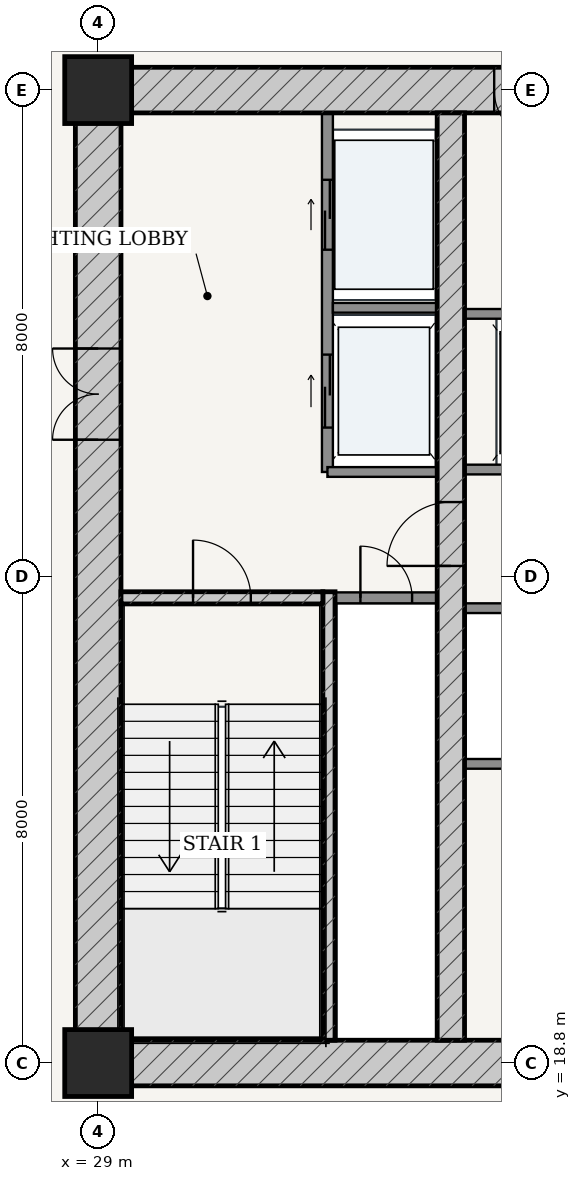
"""IFC4 building model, lengths in metres.
Left out: names, types, materials, properties, quantities, classifications, styles, units other than length and angle.
Written with IfcOpenShell. Run it as: python <this file> out.ifc"""

import sys

from ifc_helpers import new_model, si_unit, direction, frame, frame_2d, origin, origin_2d, place, context, subcontext, project, spatial, rectangle, extrude, source, transform, mapped, element, fill, save


model = new_model("IFC4")
c1 = context("Model", 3, precision=1e-05, world=origin(), true_north=direction((-0.2419218956, 0.970295726276)))
c2 = subcontext(c1, "Body", "Model", "MODEL_VIEW")
j1 = project(units=[si_unit("LENGTHUNIT", "METRE"), si_unit("PLANEANGLEUNIT", "RADIAN")], contexts=[c1])
p1 = place(None, origin())
s1 = spatial("IfcSite", under=j1, at=p1, CompositionType="ELEMENT")
p2 = place(p1, origin())
s2 = spatial("IfcBuilding", under=s1, at=p2, CompositionType="ELEMENT")
p3 = place(p2, frame((0.0, 0.0, 14.4)))
s3 = spatial("IfcBuildingStorey", under=s2, at=p3, CompositionType="ELEMENT", Elevation=14.4)
for number, where, z_axis, x_axis in (
    (1, (29.0, 18.8, 0.0), (0.0, 0.0, 1.0), (1.0, 0.0, 0.0)),
    (2, (29.0, 34.8, 0.0), (0.0, 0.0, 1.0), (1.0, 0.0, 0.0)),
):
    element("IfcColumn", number, at=place(p3, frame(where, z_axis=z_axis, x_axis=x_axis)), inside=s3, PredefinedType="COLUMN", context=c2, shape_type="SweptSolid", body=[
        extrude(rectangle(XDim=1.1, YDim=1.1, at=origin_2d()), origin(), (0.0, 0.0, 1.0), 4.5),
    ])
p4 = place(p3, frame((28.625, 18.8, 0.0), z_axis=(0.0, 0.0, 1.0), x_axis=(1.0, 0.0, 0.0)))
e3 = element("IfcWall", 3, at=p4, inside=s3, PredefinedType="SHEAR", context=c2, shape_type="SweptSolid", body=[
    extrude(rectangle(XDim=18.75, YDim=0.75, at=frame_2d((9.375, 0.0))), origin(), (0.0, 0.0, 1.0), 4.05),
])
p5 = place(p4, frame((7.627, 0.0, 0.0)))
e4 = element("IfcOpeningElement", 4, at=p5, cuts=e3, PredefinedType="OPENING", context=c2, shape_type="SweptSolid", body=[
    extrude(rectangle(XDim=0.85, YDim=2.1, at=frame_2d((0.425, 1.05))), frame((0.0, 0.385, 0.0), z_axis=(0.0, -1.0, 0.0), x_axis=(1.0, 0.0, 0.0)), (0.0, 0.0, 1.0), 0.77),
])
p6 = place(p4, frame((10.673, 0.0, 0.0)))
e5 = element("IfcOpeningElement", 5, at=p6, cuts=e3, PredefinedType="OPENING", context=c2, shape_type="SweptSolid", body=[
    extrude(rectangle(XDim=0.85, YDim=2.1, at=frame_2d((0.425, 1.05))), frame((0.0, 0.385, 0.0), z_axis=(0.0, -1.0, 0.0), x_axis=(1.0, 0.0, 0.0)), (0.0, 0.0, 1.0), 0.77),
])
p7 = place(p3, frame((28.625, 34.8, 0.0), z_axis=(0.0, 0.0, 1.0), x_axis=(1.0, 0.0, 0.0)))
e6 = element("IfcWall", 6, at=p7, inside=s3, PredefinedType="SHEAR", context=c2, shape_type="SweptSolid", body=[
    extrude(rectangle(XDim=18.75, YDim=0.75, at=frame_2d((9.375, 0.0))), origin(), (0.0, 0.0, 1.0), 4.05),
])
p8 = place(p7, frame((6.887, 0.0, 0.0)))
e7 = element("IfcOpeningElement", 7, at=p8, cuts=e6, PredefinedType="OPENING", context=c2, shape_type="SweptSolid", body=[
    extrude(rectangle(XDim=0.85, YDim=2.1, at=frame_2d((0.425, 1.05))), frame((0.0, 0.385, 0.0), z_axis=(0.0, -1.0, 0.0), x_axis=(1.0, 0.0, 0.0)), (0.0, 0.0, 1.0), 0.77),
])
p9 = place(p7, frame((8.945, 0.0, 0.0)))
e8 = element("IfcOpeningElement", 8, at=p9, cuts=e6, PredefinedType="OPENING", context=c2, shape_type="SweptSolid", body=[
    extrude(rectangle(XDim=0.86, YDim=2.1, at=frame_2d((0.43, 1.05))), frame((0.0, 0.385, 0.0), z_axis=(0.0, -1.0, 0.0), x_axis=(1.0, 0.0, 0.0)), (0.0, 0.0, 1.0), 0.77),
])
p10 = place(p7, frame((11.012, 0.0, 0.0)))
e9 = element("IfcOpeningElement", 9, at=p10, cuts=e6, PredefinedType="OPENING", context=c2, shape_type="SweptSolid", body=[
    extrude(rectangle(XDim=0.85, YDim=2.1, at=frame_2d((0.425, 1.05))), frame((0.0, 0.385, 0.0), z_axis=(0.0, -1.0, 0.0), x_axis=(1.0, 0.0, 0.0)), (0.0, 0.0, 1.0), 0.77),
])
p11 = place(p3, frame((29.0, 19.175, 0.0), z_axis=(0.0, 0.0, 1.0), x_axis=(0.0, 1.0, 0.0)))
e10 = element("IfcWall", 10, at=p11, inside=s3, PredefinedType="SHEAR", context=c2, shape_type="SweptSolid", body=[
    extrude(rectangle(XDim=15.25, YDim=0.75, at=frame_2d((7.625, 0.0))), origin(), (0.0, 0.0, 1.0), 4.05),
])
p12 = place(p11, frame((9.875, 0.0, 0.0)))
e11 = element("IfcOpeningElement", 11, at=p12, cuts=e10, PredefinedType="OPENING", context=c2, shape_type="SweptSolid", body=[
    extrude(rectangle(XDim=1.5, YDim=2.2, at=frame_2d((0.75, 1.1))), frame((0.0, 0.385, 0.0), z_axis=(0.0, -1.0, 0.0), x_axis=(1.0, 0.0, 0.0)), (0.0, 0.0, 1.0), 0.77),
])
p13 = place(p3, frame((32.795, 19.175, 0.0), z_axis=(0.0, 0.0, 1.0), x_axis=(0.0, 1.0, 0.0)))
e12 = element("IfcWall", 12, at=p13, inside=s3, PredefinedType="SOLIDWALL", context=c2, shape_type="SweptSolid", body=[
    extrude(rectangle(XDim=7.375, YDim=0.2, at=frame_2d((3.688, 0.0))), origin(), (0.0, 0.0, 1.0), 4.05),
])
p14 = place(p3, frame((29.375, 26.45, 0.0), z_axis=(0.0, 0.0, 1.0), x_axis=(1.0, 0.0, 0.0)))
e13 = element("IfcWall", 13, at=p14, inside=s3, PredefinedType="SOLIDWALL", context=c2, shape_type="SweptSolid", body=[
    extrude(rectangle(XDim=3.32, YDim=0.2, at=frame_2d((1.66, 0.0))), origin(), (0.0, 0.0, 1.0), 4.05),
])
p15 = place(p14, frame((1.185, 0.0, 0.0)))
e14 = element("IfcOpeningElement", 14, at=p15, cuts=e13, PredefinedType="OPENING", context=c2, shape_type="SweptSolid", body=[
    extrude(rectangle(XDim=0.95, YDim=2.15, at=frame_2d((0.475, 1.075))), frame((0.0, 0.11, 0.0), z_axis=(0.0, -1.0, 0.0), x_axis=(1.0, 0.0, 0.0)), (0.0, 0.0, 1.0), 0.22),
])
p16 = place(p3, frame((34.8, 19.175, 0.0), z_axis=(0.0, 0.0, 1.0), x_axis=(0.0, 1.0, 0.0)))
e15 = element("IfcWall", 15, at=p16, inside=s3, PredefinedType="SHEAR", context=c2, shape_type="SweptSolid", body=[
    extrude(rectangle(XDim=15.25, YDim=0.45, at=frame_2d((7.625, 0.0))), origin(), (0.0, 0.0, 1.0), 4.05),
])
p17 = place(p16, frame((7.8, 0.0, 0.0)))
e16 = element("IfcOpeningElement", 16, at=p17, cuts=e15, PredefinedType="OPENING", context=c2, shape_type="SweptSolid", body=[
    extrude(rectangle(XDim=1.05, YDim=2.15, at=frame_2d((0.525, 1.075))), frame((0.0, 0.235, 0.0), z_axis=(0.0, -1.0, 0.0), x_axis=(1.0, 0.0, 0.0)), (0.0, 0.0, 1.0), 0.47),
])
p18 = place(p3, frame((32.9, 26.45, 0.0), z_axis=(0.0, 0.0, 1.0), x_axis=(1.0, 0.0, 0.0)))
e17 = element("IfcWall", 17, at=p18, inside=s3, PredefinedType="PARTITIONING", context=c2, shape_type="SweptSolid", body=[
    extrude(rectangle(XDim=1.675, YDim=0.18, at=frame_2d((0.837, 0.0))), origin(), (0.0, 0.0, 1.0), 4.05),
])
p19 = place(p18, frame((0.413, 0.0, 0.0)))
e18 = element("IfcOpeningElement", 18, at=p19, cuts=e17, PredefinedType="OPENING", context=c2, shape_type="SweptSolid", body=[
    extrude(rectangle(XDim=0.85, YDim=2.1, at=frame_2d((0.425, 1.05))), frame((0.0, 0.1, 0.0), z_axis=(0.0, -1.0, 0.0), x_axis=(1.0, 0.0, 0.0)), (0.0, 0.0, 1.0), 0.2),
])
p20 = place(p3, frame((32.77, 28.52, 0.0), z_axis=(0.0, 0.0, 1.0), x_axis=(0.0, 1.0, 0.0)))
e19 = element("IfcWall", 19, at=p20, inside=s3, PredefinedType="PARTITIONING", context=c2, shape_type="SweptSolid", body=[
    extrude(rectangle(XDim=5.905, YDim=0.18, at=frame_2d((2.953, 0.0))), origin(), (0.0, 0.0, 1.0), 4.05),
])
p21 = place(p20, frame((3.655, 0.0, 0.0)))
e20 = element("IfcOpeningElement", 20, at=p21, cuts=e19, PredefinedType="OPENING", context=c2, shape_type="SweptSolid", body=[
    extrude(rectangle(XDim=1.15, YDim=2.2, at=frame_2d((0.575, 1.1))), frame((0.0, 0.1, 0.0), z_axis=(0.0, -1.0, 0.0), x_axis=(1.0, 0.0, 0.0)), (0.0, 0.0, 1.0), 0.2),
])
p22 = place(p20, frame((0.73, 0.0, 0.0)))
e21 = element("IfcOpeningElement", 21, at=p22, cuts=e19, PredefinedType="OPENING", context=c2, shape_type="SweptSolid", body=[
    extrude(rectangle(XDim=1.2, YDim=2.25, at=frame_2d((0.6, 1.125))), frame((0.0, 0.1, 0.0), z_axis=(0.0, -1.0, 0.0), x_axis=(1.0, 0.0, 0.0)), (0.0, 0.0, 1.0), 0.2),
])
p23 = place(p3, frame((32.86, 31.22, 0.0), z_axis=(0.0, 0.0, 1.0), x_axis=(1.0, 0.0, 0.0)))
e22 = element("IfcWall", 22, at=p23, inside=s3, PredefinedType="PARTITIONING", context=c2, shape_type="SweptSolid", body=[
    extrude(rectangle(XDim=1.715, YDim=0.16, at=frame_2d((0.857, 0.0))), origin(), (0.0, 0.0, 1.0), 4.05),
])
p24 = place(p3, frame((32.77, 28.52, 0.0), z_axis=(0.0, 0.0, 1.0), x_axis=(1.0, 0.0, 0.0)))
e23 = element("IfcWall", 23, at=p24, inside=s3, PredefinedType="PARTITIONING", context=c2, shape_type="SweptSolid", body=[
    extrude(rectangle(XDim=1.805, YDim=0.16, at=frame_2d((0.902, 0.0))), origin(), (0.0, 0.0, 1.0), 4.05),
])
p25 = place(p3, frame((35.025, 28.56, 0.0), z_axis=(0.0, 0.0, 1.0), x_axis=(1.0, 0.0, 0.0)))
e24 = element("IfcWall", 24, at=p25, inside=s3, PredefinedType="PARTITIONING", context=c2, shape_type="SweptSolid", body=[
    extrude(rectangle(XDim=5.95, YDim=0.16, at=frame_2d((2.975, 0.0))), origin(), (0.0, 0.0, 1.0), 4.05),
])
p26 = place(p25, frame((0.76, 0.0, 0.0)))
e25 = element("IfcOpeningElement", 25, at=p26, cuts=e24, PredefinedType="OPENING", context=c2, shape_type="SweptSolid", body=[
    extrude(rectangle(XDim=1.1, YDim=2.2, at=frame_2d((0.55, 1.1))), frame((0.0, 0.09, 0.0), z_axis=(0.0, -1.0, 0.0), x_axis=(1.0, 0.0, 0.0)), (0.0, 0.0, 1.0), 0.18),
])
p27 = place(p25, frame((2.425, 0.0, 0.0)))
e26 = element("IfcOpeningElement", 26, at=p27, cuts=e24, PredefinedType="OPENING", context=c2, shape_type="SweptSolid", body=[
    extrude(rectangle(XDim=1.1, YDim=2.2, at=frame_2d((0.55, 1.1))), frame((0.0, 0.09, 0.0), z_axis=(0.0, -1.0, 0.0), x_axis=(1.0, 0.0, 0.0)), (0.0, 0.0, 1.0), 0.18),
])
p28 = place(p25, frame((4.09, 0.0, 0.0)))
e27 = element("IfcOpeningElement", 27, at=p28, cuts=e24, PredefinedType="OPENING", context=c2, shape_type="SweptSolid", body=[
    extrude(rectangle(XDim=1.1, YDim=2.2, at=frame_2d((0.55, 1.1))), frame((0.0, 0.09, 0.0), z_axis=(0.0, -1.0, 0.0), x_axis=(1.0, 0.0, 0.0)), (0.0, 0.0, 1.0), 0.18),
])
for number, where, z_axis, x_axis in (
    (28, (35.025, 31.12, 0.0), (0.0, 0.0, 1.0), (1.0, 0.0, 0.0)),
    (29, (35.025, 26.28, 0.0), (0.0, 0.0, 1.0), (1.0, 0.0, 0.0)),
    (30, (35.025, 23.72, 0.0), (0.0, 0.0, 1.0), (1.0, 0.0, 0.0)),
):
    element("IfcWall", number, at=place(p3, frame(where, z_axis=z_axis, x_axis=x_axis)), inside=s3, PredefinedType="PARTITIONING", context=c2, shape_type="SweptSolid", body=[
        extrude(rectangle(XDim=5.95, YDim=0.16, at=frame_2d((2.975, 0.0))), origin(), (0.0, 0.0, 1.0), 4.05),
    ])
m1 = source(origin(), c2, "Body", "SweptSolid", [
    extrude(rectangle(XDim=1.5, YDim=2.2, at=frame_2d((0.75, 1.1))), frame((0.0, 0.025, 0.0), z_axis=(0.0, -1.0, 0.0), x_axis=(1.0, 0.0, 0.0)), (0.0, 0.0, 1.0), 0.05),
])
p29 = place(p12, origin())
e31 = element("IfcDoor", 31, at=p29, inside=s3, OperationType="DOUBLE_DOOR_SINGLE_SWING", PredefinedType="DOOR", context=c2, shape_type="MappedRepresentation", body=[
    mapped(m1, transform((0.0, 0.0, 0.0), scale=1.0)),
])
fill(e11, e31)
m2 = source(origin(), c2, "Body", "SweptSolid", [
    extrude(rectangle(XDim=1.05, YDim=2.15, at=frame_2d((0.525, 1.075))), frame((0.0, 0.025, 0.0), z_axis=(0.0, -1.0, 0.0), x_axis=(1.0, 0.0, 0.0)), (0.0, 0.0, 1.0), 0.05),
])
p30 = place(p17, origin())
e32 = element("IfcDoor", 32, at=p30, inside=s3, OperationType="SINGLE_SWING_LEFT", PredefinedType="DOOR", context=c2, shape_type="MappedRepresentation", body=[
    mapped(m2, transform((0.0, 0.0, 0.0), scale=1.0)),
])
fill(e16, e32)
m3 = source(origin(), c2, "Body", "SweptSolid", [
    extrude(rectangle(XDim=0.95, YDim=2.15, at=frame_2d((0.475, 1.075))), frame((0.0, 0.025, 0.0), z_axis=(0.0, -1.0, 0.0), x_axis=(1.0, 0.0, 0.0)), (0.0, 0.0, 1.0), 0.05),
])
p31 = place(p15, origin())
e33 = element("IfcDoor", 33, at=p31, inside=s3, OperationType="SINGLE_SWING_LEFT", PredefinedType="DOOR", context=c2, shape_type="MappedRepresentation", body=[
    mapped(m3, transform((0.0, 0.0, 0.0), scale=1.0)),
])
fill(e14, e33)
m4 = source(origin(), c2, "Body", "SweptSolid", [
    extrude(rectangle(XDim=0.85, YDim=2.1, at=frame_2d((0.425, 1.05))), frame((0.0, 0.025, 0.0), z_axis=(0.0, -1.0, 0.0), x_axis=(1.0, 0.0, 0.0)), (0.0, 0.0, 1.0), 0.05),
])
p32 = place(p19, origin())
e34 = element("IfcDoor", 34, at=p32, inside=s3, OperationType="SINGLE_SWING_LEFT", PredefinedType="DOOR", context=c2, shape_type="MappedRepresentation", body=[
    mapped(m4, transform((0.0, 0.0, 0.0), scale=1.0)),
])
fill(e18, e34)
p33 = place(p8, frame((0.85, 0.0, 0.0), z_axis=(0.0, 0.0, 1.0), x_axis=(-1.0, 0.0, 0.0)))
e35 = element("IfcDoor", 35, at=p33, inside=s3, OperationType="SINGLE_SWING_LEFT", PredefinedType="DOOR", context=c2, shape_type="MappedRepresentation", body=[
    mapped(m4, transform((0.0, 0.0, 0.0), scale=1.0)),
])
fill(e7, e35)
m5 = source(origin(), c2, "Body", "SweptSolid", [
    extrude(rectangle(XDim=1.15, YDim=2.2, at=frame_2d((0.575, 1.1))), frame((0.0, 0.025, 0.0), z_axis=(0.0, -1.0, 0.0), x_axis=(1.0, 0.0, 0.0)), (0.0, 0.0, 1.0), 0.05),
])
p34 = place(p21, origin())
e36 = element("IfcDoor", 36, at=p34, inside=s3, OperationType="DOUBLE_DOOR_SLIDING", PredefinedType="DOOR", context=c2, shape_type="MappedRepresentation", body=[
    mapped(m5, transform((0.0, 0.0, 0.0), scale=1.0)),
])
fill(e20, e36)
m6 = source(origin(), c2, "Body", "SweptSolid", [
    extrude(rectangle(XDim=1.2, YDim=2.25, at=frame_2d((0.6, 1.125))), frame((0.0, 0.025, 0.0), z_axis=(0.0, -1.0, 0.0), x_axis=(1.0, 0.0, 0.0)), (0.0, 0.0, 1.0), 0.05),
])
p35 = place(p22, origin())
e37 = element("IfcDoor", 37, at=p35, inside=s3, OperationType="DOUBLE_DOOR_SLIDING", PredefinedType="DOOR", context=c2, shape_type="MappedRepresentation", body=[
    mapped(m6, transform((0.0, 0.0, 0.0), scale=1.0)),
])
fill(e21, e37)
save(model, sys.argv[1])
